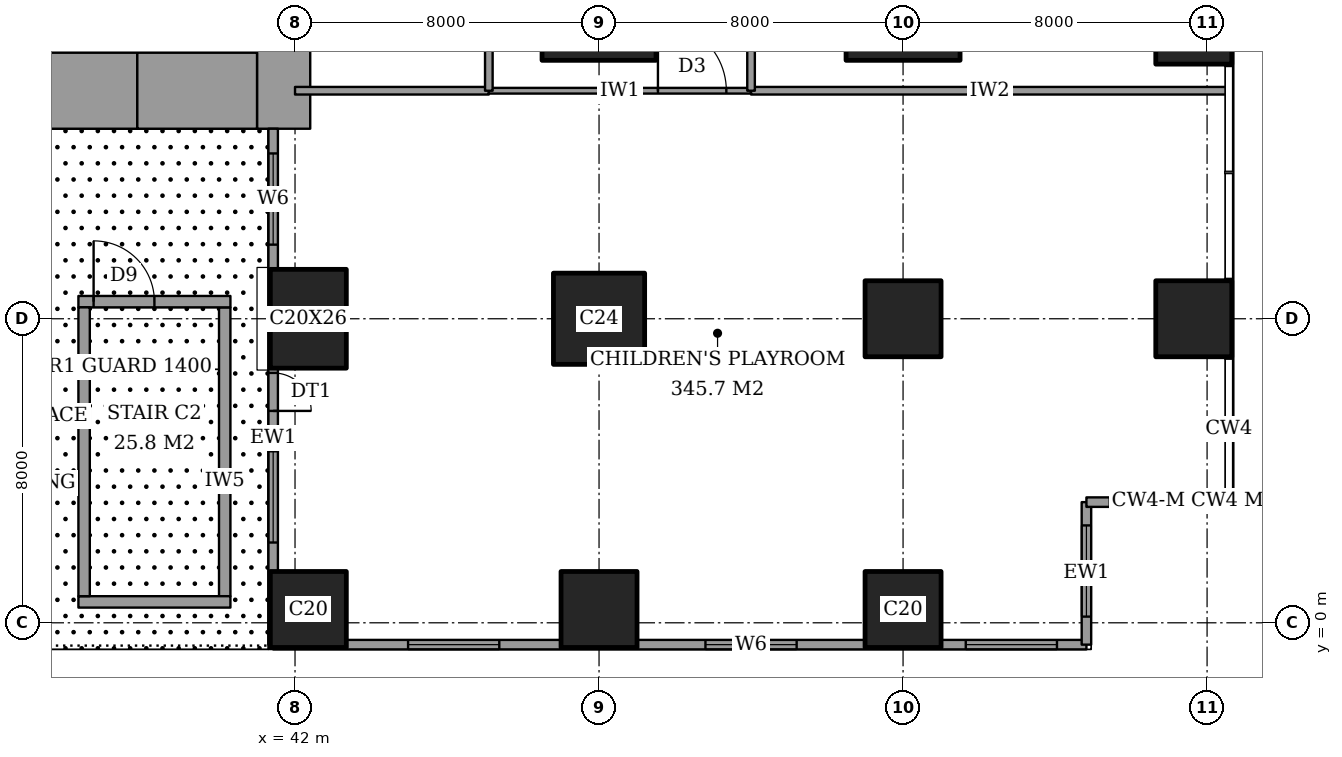
"""IFC4 building model, lengths in metres.
Left out: names, types, materials, properties, quantities, classifications, styles, units other than length and angle.
Written with IfcOpenShell. Run it as: python <this file> out.ifc"""

import sys

from ifc_helpers import new_model, si_unit, direction, frame, frame_2d, origin, origin_2d, place, context, subcontext, project, spatial, rectangle, extrude, element, fill, save


model = new_model("IFC4")
c1 = context("Model", 3, precision=1e-05, world=origin(), true_north=direction((0.0, 1.0)))
c2 = subcontext(c1, "Body", "Model", "MODEL_VIEW")
j1 = project(units=[si_unit("LENGTHUNIT", "METRE"), si_unit("PLANEANGLEUNIT", "RADIAN")], contexts=[c1])
p1 = place(None, origin())
s1 = spatial("IfcSite", under=j1, at=p1, CompositionType="ELEMENT")
p2 = place(p1, origin())
s2 = spatial("IfcBuilding", under=s1, at=p2, CompositionType="ELEMENT")
p3 = place(p2, frame((0.0, 0.0, 26.0)))
s3 = spatial("IfcBuildingStorey", under=s2, at=p3, CompositionType="ELEMENT", Elevation=26.0)
p4 = place(p3, frame((42.35, 0.35, 0.0), z_axis=(0.0, 0.0, 1.0), x_axis=(1.0, 0.0, 0.0)))
e1 = element("IfcColumn", 1, at=p4, inside=s3, PredefinedType="COLUMN", context=c2, shape_type="SweptSolid", body=[
    extrude(rectangle(XDim=2.0, YDim=2.0, at=origin_2d()), origin(), (0.0, 0.0, 1.0), 3.6),
])
p5 = place(p3, frame((42.35, 8.0, 0.0), z_axis=(0.0, 0.0, 1.0), x_axis=(1.0, 0.0, 0.0)))
e2 = element("IfcColumn", 2, at=p5, inside=s3, PredefinedType="COLUMN", context=c2, shape_type="SweptSolid", body=[
    extrude(rectangle(XDim=2.0, YDim=2.6, at=origin_2d()), origin(), (0.0, 0.0, 1.0), 3.6),
])
p6 = place(p3, frame((50.0, 0.35, 0.0), z_axis=(0.0, 0.0, 1.0), x_axis=(1.0, 0.0, 0.0)))
e3 = element("IfcColumn", 3, at=p6, inside=s3, PredefinedType="COLUMN", context=c2, shape_type="SweptSolid", body=[
    extrude(rectangle(XDim=2.0, YDim=2.0, at=origin_2d()), origin(), (0.0, 0.0, 1.0), 3.6),
])
p7 = place(p3, frame((50.0, 8.0, 0.0), z_axis=(0.0, 0.0, 1.0), x_axis=(1.0, 0.0, 0.0)))
e4 = element("IfcColumn", 4, at=p7, inside=s3, PredefinedType="COLUMN", context=c2, shape_type="SweptSolid", body=[
    extrude(rectangle(XDim=2.4, YDim=2.4, at=origin_2d()), origin(), (0.0, 0.0, 1.0), 3.6),
])
p8 = place(p3, frame((50.0, 16.0, 0.0), z_axis=(0.0, 0.0, 1.0), x_axis=(1.0, 0.0, 0.0)))
e5 = element("IfcColumn", 5, at=p8, inside=s3, PredefinedType="COLUMN", context=c2, shape_type="SweptSolid", body=[
    extrude(rectangle(XDim=3.0, YDim=2.4, at=origin_2d()), origin(), (0.0, 0.0, 1.0), 3.6),
])
for number, where, z_axis, x_axis in (
    (6, (58.0, 0.35, 0.0), (0.0, 0.0, 1.0), (1.0, 0.0, 0.0)),
    (7, (58.0, 8.0, 0.0), (0.0, 0.0, 1.0), (1.0, 0.0, 0.0)),
):
    element("IfcColumn", number, at=place(p3, frame(where, z_axis=z_axis, x_axis=x_axis)), inside=s3, PredefinedType="COLUMN", context=c2, shape_type="SweptSolid", body=[
        extrude(rectangle(XDim=2.0, YDim=2.0, at=origin_2d()), origin(), (0.0, 0.0, 1.0), 3.6),
    ])
p9 = place(p3, frame((58.0, 16.0, 0.0), z_axis=(0.0, 0.0, 1.0), x_axis=(1.0, 0.0, 0.0)))
e8 = element("IfcColumn", 8, at=p9, inside=s3, PredefinedType="COLUMN", context=c2, shape_type="SweptSolid", body=[
    extrude(rectangle(XDim=3.0, YDim=2.4, at=origin_2d()), origin(), (0.0, 0.0, 1.0), 3.6),
])
p10 = place(p3, frame((65.65, 8.0, 0.0), z_axis=(0.0, 0.0, 1.0), x_axis=(1.0, 0.0, 0.0)))
e9 = element("IfcColumn", 9, at=p10, inside=s3, PredefinedType="COLUMN", context=c2, shape_type="SweptSolid", body=[
    extrude(rectangle(XDim=2.0, YDim=2.0, at=origin_2d()), origin(), (0.0, 0.0, 1.0), 3.6),
])
p11 = place(p3, frame((65.65, 16.0, 0.0), z_axis=(0.0, 0.0, 1.0), x_axis=(0.0, 1.0, 0.0)))
e10 = element("IfcColumn", 10, at=p11, inside=s3, PredefinedType="COLUMN", context=c2, shape_type="SweptSolid", body=[
    extrude(rectangle(XDim=2.6, YDim=2.0, at=origin_2d()), origin(), (0.0, 0.0, 1.0), 3.6),
])
p12 = place(p3, frame((28.15, 14.0, 0.0), z_axis=(0.0, 0.0, 1.0), x_axis=(1.0, 0.0, 0.0)))
e11 = element("IfcWall", 11, at=p12, inside=s3, PredefinedType="SHEAR", context=c2, shape_type="SweptSolid", body=[
    extrude(rectangle(XDim=9.7, YDim=2.0, at=frame_2d((4.85, 0.0))), origin(), (0.0, 0.0, 1.0), 3.6),
])
p13 = place(p3, frame((37.85, 14.0, 0.0), z_axis=(0.0, 0.0, 1.0), x_axis=(1.0, 0.0, 0.0)))
e12 = element("IfcWall", 12, at=p13, inside=s3, PredefinedType="SHEAR", context=c2, shape_type="SweptSolid", body=[
    extrude(rectangle(XDim=3.15, YDim=2.0, at=frame_2d((1.575, 0.0))), origin(), (0.0, 0.0, 1.0), 3.6),
])
p14 = place(p3, frame((41.7, 13.0, 0.0), z_axis=(0.0, 0.0, 1.0), x_axis=(0.0, 1.0, 0.0)))
e13 = element("IfcWall", 13, at=p14, inside=s3, PredefinedType="SHEAR", context=c2, shape_type="SweptSolid", body=[
    extrude(rectangle(XDim=11.85, YDim=1.4, at=frame_2d((5.925, 0.0))), origin(), (0.0, 0.0, 1.0), 3.6),
])
p15 = place(p14, frame((7.5, 0.0, 0.0)))
e14 = element("IfcOpeningElement", 14, at=p15, cuts=e13, PredefinedType="OPENING", context=c2, shape_type="SweptSolid", body=[
    extrude(rectangle(XDim=1.8, YDim=2.4, at=frame_2d((0.9, 1.2))), frame((0.0, 0.71, 0.0), z_axis=(0.0, -1.0, 0.0), x_axis=(1.0, 0.0, 0.0)), (0.0, 0.0, 1.0), 1.42),
])
p16 = place(p3, frame((41.425, 13.0, 0.0), z_axis=(0.0, 0.0, 1.0), x_axis=(0.0, -1.0, 0.0)))
e15 = element("IfcWall", 15, at=p16, inside=s3, PredefinedType="SOLIDWALL", context=c2, shape_type="SweptSolid", body=[
    extrude(rectangle(XDim=13.575, YDim=0.25, at=frame_2d((6.788, 0.0))), origin(), (0.0, 0.0, 1.0), 3.6),
])
p17 = place(p16, frame((6.425, 0.0, 0.0)))
e16 = element("IfcOpeningElement", 16, at=p17, cuts=e15, PredefinedType="OPENING", context=c2, shape_type="SweptSolid", body=[
    extrude(rectangle(XDim=1.0, YDim=2.4, at=frame_2d((0.5, 1.2))), frame((0.0, 0.135, 0.0), z_axis=(0.0, -1.0, 0.0), x_axis=(1.0, 0.0, 0.0)), (0.0, 0.0, 1.0), 0.27),
])
p18 = place(p16, frame((0.65, 0.0, 0.6)))
e17 = element("IfcOpeningElement", 17, at=p18, cuts=e15, PredefinedType="OPENING", context=c2, shape_type="SweptSolid", body=[
    extrude(rectangle(XDim=2.4, YDim=2.0, at=frame_2d((1.2, 1.0))), frame((0.0, 0.135, 0.0), z_axis=(0.0, -1.0, 0.0), x_axis=(1.0, 0.0, 0.0)), (0.0, 0.0, 1.0), 0.27),
])
p19 = place(p16, frame((8.488, 0.0, 0.6)))
e18 = element("IfcOpeningElement", 18, at=p19, cuts=e15, PredefinedType="OPENING", context=c2, shape_type="SweptSolid", body=[
    extrude(rectangle(XDim=2.4, YDim=2.0, at=frame_2d((1.2, 1.0))), frame((0.0, 0.135, 0.0), z_axis=(0.0, -1.0, 0.0), x_axis=(1.0, 0.0, 0.0)), (0.0, 0.0, 1.0), 0.27),
])
p20 = place(p3, frame((41.425, -0.575, 0.0), z_axis=(0.0, 0.0, 1.0), x_axis=(1.0, 0.0, 0.0)))
e19 = element("IfcWall", 19, at=p20, inside=s3, PredefinedType="SOLIDWALL", context=c2, shape_type="SweptSolid", body=[
    extrude(rectangle(XDim=21.4, YDim=0.25, at=frame_2d((10.7, 0.0))), origin(), (0.0, 0.0, 1.0), 3.6),
])
p21 = place(p20, frame((3.55, 0.0, 0.6)))
e20 = element("IfcOpeningElement", 20, at=p21, cuts=e19, PredefinedType="OPENING", context=c2, shape_type="SweptSolid", body=[
    extrude(rectangle(XDim=2.4, YDim=2.0, at=frame_2d((1.2, 1.0))), frame((0.0, 0.135, 0.0), z_axis=(0.0, -1.0, 0.0), x_axis=(1.0, 0.0, 0.0)), (0.0, 0.0, 1.0), 0.27),
])
p22 = place(p20, frame((11.375, 0.0, 0.6)))
e21 = element("IfcOpeningElement", 21, at=p22, cuts=e19, PredefinedType="OPENING", context=c2, shape_type="SweptSolid", body=[
    extrude(rectangle(XDim=2.4, YDim=2.0, at=frame_2d((1.2, 1.0))), frame((0.0, 0.135, 0.0), z_axis=(0.0, -1.0, 0.0), x_axis=(1.0, 0.0, 0.0)), (0.0, 0.0, 1.0), 0.27),
])
p23 = place(p20, frame((18.225, 0.0, 0.6)))
e22 = element("IfcOpeningElement", 22, at=p23, cuts=e19, PredefinedType="OPENING", context=c2, shape_type="SweptSolid", body=[
    extrude(rectangle(XDim=2.4, YDim=2.0, at=frame_2d((1.2, 1.0))), frame((0.0, 0.135, 0.0), z_axis=(0.0, -1.0, 0.0), x_axis=(1.0, 0.0, 0.0)), (0.0, 0.0, 1.0), 0.27),
])
p24 = place(p3, frame((62.825, -0.575, 0.0), z_axis=(0.0, 0.0, 1.0), x_axis=(0.0, 1.0, 0.0)))
e23 = element("IfcWall", 23, at=p24, inside=s3, PredefinedType="SOLIDWALL", context=c2, shape_type="SweptSolid", body=[
    extrude(rectangle(XDim=3.75, YDim=0.25, at=frame_2d((1.875, 0.0))), origin(), (0.0, 0.0, 1.0), 3.6),
])
p25 = place(p24, frame((0.738, 0.0, 0.6)))
e24 = element("IfcOpeningElement", 24, at=p25, cuts=e23, PredefinedType="OPENING", context=c2, shape_type="SweptSolid", body=[
    extrude(rectangle(XDim=2.4, YDim=2.0, at=frame_2d((1.2, 1.0))), frame((0.0, 0.135, 0.0), z_axis=(0.0, -1.0, 0.0), x_axis=(1.0, 0.0, 0.0)), (0.0, 0.0, 1.0), 0.27),
])
p26 = place(p3, frame((62.825, 3.175, 0.0), z_axis=(0.0, 0.0, 1.0), x_axis=(1.0, 0.0, 0.0)))
e25 = element("IfcWall", 25, at=p26, inside=s3, PredefinedType="SOLIDWALL", context=c2, shape_type="SweptSolid", body=[
    extrude(rectangle(XDim=3.75, YDim=0.25, at=frame_2d((1.875, 0.0))), origin(), (0.0, 0.0, 1.0), 3.6),
])
p27 = place(p26, frame((0.613, 0.0, 0.6)))
e26 = element("IfcOpeningElement", 26, at=p27, cuts=e25, PredefinedType="OPENING", context=c2, shape_type="SweptSolid", body=[
    extrude(rectangle(XDim=2.4, YDim=2.0, at=frame_2d((1.2, 1.0))), frame((0.0, 0.135, 0.0), z_axis=(0.0, -1.0, 0.0), x_axis=(1.0, 0.0, 0.0)), (0.0, 0.0, 1.0), 0.27),
])
p28 = place(p3, frame((42.0, 14.0, 0.0), z_axis=(0.0, 0.0, 1.0), x_axis=(1.0, 0.0, 0.0)))
e27 = element("IfcWall", 27, at=p28, inside=s3, PredefinedType="PARTITIONING", context=c2, shape_type="SweptSolid", body=[
    extrude(rectangle(XDim=5.1, YDim=0.2, at=frame_2d((2.55, 0.0))), origin(), (0.0, 0.0, 1.0), 3.35),
])
p29 = place(p3, frame((54.0, 14.0, 0.0), z_axis=(0.0, 0.0, 1.0), x_axis=(1.0, 0.0, 0.0)))
e28 = element("IfcWall", 28, at=p29, inside=s3, PredefinedType="PARTITIONING", context=c2, shape_type="SweptSolid", body=[
    extrude(rectangle(XDim=12.561, YDim=0.2, at=frame_2d((6.281, 0.0))), origin(), (0.0, 0.0, 1.0), 3.35),
])
p30 = place(p3, frame((47.1, 14.0, 0.0), z_axis=(0.0, 0.0, 1.0), x_axis=(1.0, 0.0, 0.0)))
e29 = element("IfcWall", 29, at=p30, inside=s3, PredefinedType="PARTITIONING", context=c2, shape_type="SweptSolid", body=[
    extrude(rectangle(XDim=6.9, YDim=0.15, at=frame_2d((3.45, 0.0))), origin(), (0.0, 0.0, 1.0), 3.35),
])
p31 = place(p30, frame((4.45, 0.0, 0.0)))
e30 = element("IfcOpeningElement", 30, at=p31, cuts=e29, PredefinedType="OPENING", context=c2, shape_type="SweptSolid", body=[
    extrude(rectangle(XDim=1.8, YDim=2.1, at=frame_2d((0.9, 1.05))), frame((0.0, 0.085, 0.0), z_axis=(0.0, -1.0, 0.0), x_axis=(1.0, 0.0, 0.0)), (0.0, 0.0, 1.0), 0.17),
])
p32 = place(p3, frame((47.1, 14.0, 0.0), z_axis=(0.0, 0.0, 1.0), x_axis=(0.0, 1.0, 0.0)))
e31 = element("IfcWall", 31, at=p32, inside=s3, PredefinedType="PARTITIONING", context=c2, shape_type="SweptSolid", body=[
    extrude(rectangle(XDim=6.0, YDim=0.2, at=frame_2d((3.0, 0.0))), origin(), (0.0, 0.0, 1.0), 3.35),
])
p33 = place(p32, frame((1.3, 0.0, 0.0)))
e32 = element("IfcOpeningElement", 32, at=p33, cuts=e31, PredefinedType="OPENING", context=c2, shape_type="SweptSolid", body=[
    extrude(rectangle(XDim=0.9, YDim=2.1, at=frame_2d((0.45, 1.05))), frame((0.0, 0.11, 0.0), z_axis=(0.0, -1.0, 0.0), x_axis=(1.0, 0.0, 0.0)), (0.0, 0.0, 1.0), 0.22),
])
p34 = place(p32, frame((4.3, 0.0, 0.0)))
e33 = element("IfcOpeningElement", 33, at=p34, cuts=e31, PredefinedType="OPENING", context=c2, shape_type="SweptSolid", body=[
    extrude(rectangle(XDim=0.9, YDim=2.1, at=frame_2d((0.45, 1.05))), frame((0.0, 0.11, 0.0), z_axis=(0.0, -1.0, 0.0), x_axis=(1.0, 0.0, 0.0)), (0.0, 0.0, 1.0), 0.22),
])
p35 = place(p3, frame((54.0, 14.0, 0.0), z_axis=(0.0, 0.0, 1.0), x_axis=(0.0, 1.0, 0.0)))
e34 = element("IfcWall", 34, at=p35, inside=s3, PredefinedType="PARTITIONING", context=c2, shape_type="SweptSolid", body=[
    extrude(rectangle(XDim=12.0, YDim=0.2, at=frame_2d((6.0, 0.0))), origin(), (0.0, 0.0, 1.0), 3.35),
])
p36 = place(p35, frame((5.5, 0.0, 0.0)))
e35 = element("IfcOpeningElement", 35, at=p36, cuts=e34, PredefinedType="OPENING", context=c2, shape_type="SweptSolid", body=[
    extrude(rectangle(XDim=1.0, YDim=2.1, at=frame_2d((0.5, 1.05))), frame((0.0, 0.11, 0.0), z_axis=(0.0, -1.0, 0.0), x_axis=(1.0, 0.0, 0.0)), (0.0, 0.0, 1.0), 0.22),
])
p37 = place(p3, frame((37.85, 15.0, 0.0), z_axis=(0.0, 0.0, 1.0), x_axis=(0.0, 1.0, 0.0)))
e36 = element("IfcWall", 36, at=p37, inside=s3, PredefinedType="SHEAR", context=c2, shape_type="SweptSolid", body=[
    extrude(rectangle(XDim=2.8, YDim=0.3, at=frame_2d((1.4, 0.0))), origin(), (0.0, 0.0, 1.0), 3.6),
])
p38 = place(p3, frame((36.3, 0.55, 0.0), z_axis=(0.0, 0.0, 1.0), x_axis=(1.0, 0.0, 0.0)))
e37 = element("IfcWall", 37, at=p38, inside=s3, PredefinedType="PARTITIONING", context=c2, shape_type="SweptSolid", body=[
    extrude(rectangle(XDim=4.0, YDim=0.3, at=frame_2d((2.0, 0.0))), origin(), (0.0, 0.0, 1.0), 3.35),
])
p39 = place(p3, frame((36.3, 8.45, 0.0), z_axis=(0.0, 0.0, 1.0), x_axis=(1.0, 0.0, 0.0)))
e38 = element("IfcWall", 38, at=p39, inside=s3, PredefinedType="PARTITIONING", context=c2, shape_type="SweptSolid", body=[
    extrude(rectangle(XDim=4.0, YDim=0.3, at=frame_2d((2.0, 0.0))), origin(), (0.0, 0.0, 1.0), 3.35),
])
p40 = place(p39, frame((0.4, 0.0, 0.0)))
e39 = element("IfcOpeningElement", 39, at=p40, cuts=e38, PredefinedType="OPENING", context=c2, shape_type="SweptSolid", body=[
    extrude(rectangle(XDim=1.6, YDim=2.1, at=frame_2d((0.8, 1.05))), frame((0.0, 0.16, 0.0), z_axis=(0.0, -1.0, 0.0), x_axis=(1.0, 0.0, 0.0)), (0.0, 0.0, 1.0), 0.32),
])
for number, where, z_axis, x_axis in (
    (40, (36.45, 0.7, 0.0), (0.0, 0.0, 1.0), (0.0, 1.0, 0.0)),
    (41, (40.15, 0.7, 0.0), (0.0, 0.0, 1.0), (0.0, 1.0, 0.0)),
):
    element("IfcWall", number, at=place(p3, frame(where, z_axis=z_axis, x_axis=x_axis)), inside=s3, PredefinedType="PARTITIONING", context=c2, shape_type="SweptSolid", body=[
        extrude(rectangle(XDim=7.6, YDim=0.3, at=frame_2d((3.8, 0.0))), origin(), (0.0, 0.0, 1.0), 3.35),
    ])
p41 = place(p17, origin())
e42 = element("IfcDoor", 42, at=p41, inside=s3, OperationType="SINGLE_SWING_LEFT", PredefinedType="DOOR", context=c2, shape_type="SweptSolid", body=[
    extrude(rectangle(XDim=1.0, YDim=2.4, at=frame_2d((0.5, 1.2))), frame((0.0, 0.025, 0.0), z_axis=(0.0, -1.0, 0.0), x_axis=(1.0, 0.0, 0.0)), (0.0, 0.0, 1.0), 0.05),
])
fill(e16, e42)
p42 = place(p18, origin())
e43 = element("IfcWindow", 43, at=p42, inside=s3, PartitioningType="SINGLE_PANEL", PredefinedType="WINDOW", context=c2, shape_type="SweptSolid", body=[
    extrude(rectangle(XDim=2.4, YDim=2.0, at=frame_2d((1.2, 1.0))), frame((0.0, 0.03, 0.0), z_axis=(0.0, -1.0, 0.0), x_axis=(1.0, 0.0, 0.0)), (0.0, 0.0, 1.0), 0.06),
])
fill(e17, e43)
p43 = place(p19, origin())
e44 = element("IfcWindow", 44, at=p43, inside=s3, PartitioningType="SINGLE_PANEL", PredefinedType="WINDOW", context=c2, shape_type="SweptSolid", body=[
    extrude(rectangle(XDim=2.4, YDim=2.0, at=frame_2d((1.2, 1.0))), frame((0.0, 0.03, 0.0), z_axis=(0.0, -1.0, 0.0), x_axis=(1.0, 0.0, 0.0)), (0.0, 0.0, 1.0), 0.06),
])
fill(e18, e44)
p44 = place(p21, origin())
e45 = element("IfcWindow", 45, at=p44, inside=s3, PartitioningType="SINGLE_PANEL", PredefinedType="WINDOW", context=c2, shape_type="SweptSolid", body=[
    extrude(rectangle(XDim=2.4, YDim=2.0, at=frame_2d((1.2, 1.0))), frame((0.0, 0.03, 0.0), z_axis=(0.0, -1.0, 0.0), x_axis=(1.0, 0.0, 0.0)), (0.0, 0.0, 1.0), 0.06),
])
fill(e20, e45)
p45 = place(p22, origin())
e46 = element("IfcWindow", 46, at=p45, inside=s3, PartitioningType="SINGLE_PANEL", PredefinedType="WINDOW", context=c2, shape_type="SweptSolid", body=[
    extrude(rectangle(XDim=2.4, YDim=2.0, at=frame_2d((1.2, 1.0))), frame((0.0, 0.03, 0.0), z_axis=(0.0, -1.0, 0.0), x_axis=(1.0, 0.0, 0.0)), (0.0, 0.0, 1.0), 0.06),
])
fill(e21, e46)
p46 = place(p23, origin())
e47 = element("IfcWindow", 47, at=p46, inside=s3, PartitioningType="SINGLE_PANEL", PredefinedType="WINDOW", context=c2, shape_type="SweptSolid", body=[
    extrude(rectangle(XDim=2.4, YDim=2.0, at=frame_2d((1.2, 1.0))), frame((0.0, 0.03, 0.0), z_axis=(0.0, -1.0, 0.0), x_axis=(1.0, 0.0, 0.0)), (0.0, 0.0, 1.0), 0.06),
])
fill(e22, e47)
p47 = place(p25, origin())
e48 = element("IfcWindow", 48, at=p47, inside=s3, PartitioningType="SINGLE_PANEL", PredefinedType="WINDOW", context=c2, shape_type="SweptSolid", body=[
    extrude(rectangle(XDim=2.4, YDim=2.0, at=frame_2d((1.2, 1.0))), frame((0.0, 0.03, 0.0), z_axis=(0.0, -1.0, 0.0), x_axis=(1.0, 0.0, 0.0)), (0.0, 0.0, 1.0), 0.06),
])
fill(e24, e48)
p48 = place(p27, origin())
e49 = element("IfcWindow", 49, at=p48, inside=s3, PartitioningType="SINGLE_PANEL", PredefinedType="WINDOW", context=c2, shape_type="SweptSolid", body=[
    extrude(rectangle(XDim=2.4, YDim=2.0, at=frame_2d((1.2, 1.0))), frame((0.0, 0.03, 0.0), z_axis=(0.0, -1.0, 0.0), x_axis=(1.0, 0.0, 0.0)), (0.0, 0.0, 1.0), 0.06),
])
fill(e26, e49)
p49 = place(p31, origin())
e50 = element("IfcDoor", 50, at=p49, inside=s3, OperationType="DOUBLE_DOOR_DOUBLE_SWING", PredefinedType="DOOR", context=c2, shape_type="SweptSolid", body=[
    extrude(rectangle(XDim=1.8, YDim=2.1, at=frame_2d((0.9, 1.05))), frame((0.0, 0.025, 0.0), z_axis=(0.0, -1.0, 0.0), x_axis=(1.0, 0.0, 0.0)), (0.0, 0.0, 1.0), 0.05),
])
fill(e30, e50)
p50 = place(p40, origin())
e51 = element("IfcDoor", 51, at=p50, inside=s3, OperationType="DOUBLE_DOOR_SINGLE_SWING", PredefinedType="DOOR", context=c2, shape_type="SweptSolid", body=[
    extrude(rectangle(XDim=1.6, YDim=2.1, at=frame_2d((0.8, 1.05))), frame((0.0, 0.025, 0.0), z_axis=(0.0, -1.0, 0.0), x_axis=(1.0, 0.0, 0.0)), (0.0, 0.0, 1.0), 0.05),
])
fill(e39, e51)
save(model, sys.argv[1])
